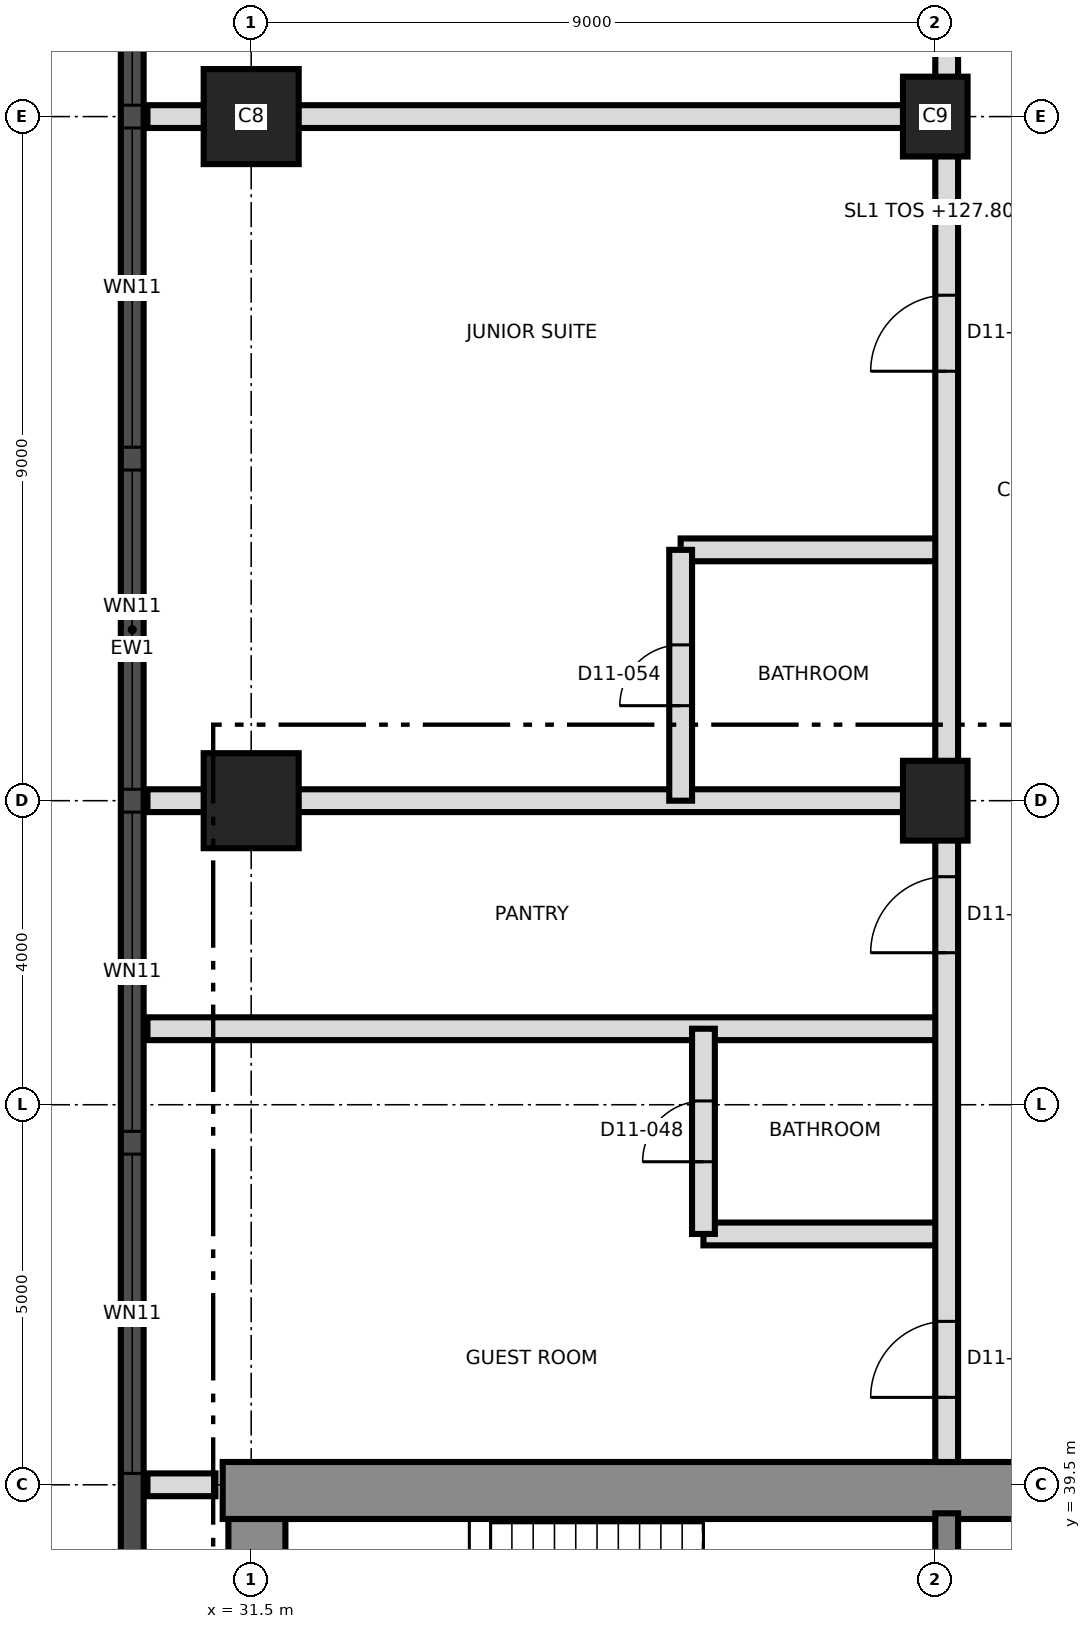
"""IFC4 building model, lengths in metres.
Left out: names, types, materials, properties, quantities, classifications, styles, units other than length and angle.
Written with IfcOpenShell. Run it as: python <this file> out.ifc"""

import sys

from ifc_helpers import new_model, si_unit, direction, frame, frame_2d, origin, origin_2d, place, context, subcontext, project, spatial, rectangle, extrude, element, fill, save


model = new_model("IFC4")
c1 = context("Model", 3, precision=1e-05, world=origin(), true_north=direction((0.0, 1.0)))
c2 = subcontext(c1, "Body", "Model", "MODEL_VIEW")
j1 = project(units=[si_unit("LENGTHUNIT", "METRE"), si_unit("PLANEANGLEUNIT", "RADIAN")], contexts=[c1])
p1 = place(None, origin())
s1 = spatial("IfcSite", under=j1, at=p1, CompositionType="ELEMENT")
p2 = place(p1, origin())
s2 = spatial("IfcBuilding", under=s1, at=p2, CompositionType="ELEMENT")
p3 = place(p2, frame((0.0, 0.0, 127.8)))
s3 = spatial("IfcBuildingStorey", under=s2, at=p3, CompositionType="ELEMENT", Elevation=127.8)
p4 = place(p3, frame((31.575, 21.875, 0.0), z_axis=(0.0, 0.0, 1.0), x_axis=(0.0, 1.0, 0.0)))
e1 = element("IfcWall", 1, at=p4, inside=s3, PredefinedType="SHEAR", context=c2, shape_type="SweptSolid", body=[
    extrude(rectangle(XDim=17.25, YDim=0.75, at=frame_2d((8.625, 0.0))), origin(), (0.0, 0.0, 1.0), 3.7),
])
p5 = place(p3, frame((31.125, 39.425, 0.0), z_axis=(0.0, 0.0, 1.0), x_axis=(1.0, 0.0, 0.0)))
e2 = element("IfcWall", 2, at=p5, inside=s3, PredefinedType="SHEAR", context=c2, shape_type="SweptSolid", body=[
    extrude(rectangle(XDim=27.0, YDim=0.75, at=frame_2d((13.5, 0.0))), origin(), (0.0, 0.0, 1.0), 3.7),
])
p6 = place(p5, frame((10.575, 0.0, 0.0)))
e3 = element("IfcOpeningElement", 3, at=p6, cuts=e2, PredefinedType="OPENING", context=c2, shape_type="SweptSolid", body=[
    extrude(rectangle(XDim=1.2, YDim=2.1, at=frame_2d((0.6, 1.05))), frame((0.0, 0.385, 0.0), z_axis=(0.0, -1.0, 0.0), x_axis=(1.0, 0.0, 0.0)), (0.0, 0.0, 1.0), 0.77),
])
p7 = place(p3, frame((40.65, 33.5, 0.0), z_axis=(0.0, 0.0, 1.0), x_axis=(0.0, 1.0, 0.0)))
e4 = element("IfcWall", 4, at=p7, inside=s3, PredefinedType="SHEAR", context=c2, shape_type="SweptSolid", body=[
    extrude(rectangle(XDim=5.625, YDim=0.3, at=frame_2d((2.812, 0.0))), origin(), (0.0, 0.0, 1.0), 3.7),
])
p8 = place(p3, frame((31.5, 48.5, 0.0), z_axis=(0.0, 0.0, 1.0), x_axis=(1.0, 0.0, 0.0)))
e5 = element("IfcColumn", 5, at=p8, inside=s3, PredefinedType="COLUMN", context=c2, shape_type="SweptSolid", body=[
    extrude(rectangle(XDim=1.25, YDim=1.25, at=origin_2d()), origin(), (0.0, 0.0, 1.0), 3.7),
])
p9 = place(p3, frame((40.5, 48.5, 0.0), z_axis=(0.0, 0.0, 1.0), x_axis=(0.0, 1.0, 0.0)))
e6 = element("IfcColumn", 6, at=p9, inside=s3, PredefinedType="COLUMN", context=c2, shape_type="SweptSolid", body=[
    extrude(rectangle(XDim=1.05, YDim=0.85, at=origin_2d()), origin(), (0.0, 0.0, 1.0), 3.7),
])
p10 = place(p3, frame((31.5, 57.5, 0.0), z_axis=(0.0, 0.0, 1.0), x_axis=(1.0, 0.0, 0.0)))
e7 = element("IfcColumn", 7, at=p10, inside=s3, PredefinedType="COLUMN", context=c2, shape_type="SweptSolid", body=[
    extrude(rectangle(XDim=1.25, YDim=1.25, at=origin_2d()), origin(), (0.0, 0.0, 1.0), 3.7),
])
p11 = place(p3, frame((40.5, 57.5, 0.0), z_axis=(0.0, 0.0, 1.0), x_axis=(0.0, 1.0, 0.0)))
e8 = element("IfcColumn", 8, at=p11, inside=s3, PredefinedType="COLUMN", context=c2, shape_type="SweptSolid", body=[
    extrude(rectangle(XDim=1.05, YDim=0.85, at=origin_2d()), origin(), (0.0, 0.0, 1.0), 3.7),
])
p12 = place(p3, frame((29.935, 66.986, 0.0), z_axis=(0.0, 0.0, 1.0), x_axis=(0.0, -1.0, 0.0)))
e9 = element("IfcWall", 9, at=p12, inside=s3, PredefinedType="SOLIDWALL", context=c2, shape_type="SweptSolid", body=[
    extrude(rectangle(XDim=32.976, YDim=0.3, at=frame_2d((16.488, 0.0))), origin(), (0.0, 0.0, 1.0), 3.4),
])
p13 = place(p12, frame((1.593, 0.0, 0.3)))
e10 = element("IfcOpeningElement", 10, at=p13, cuts=e9, PredefinedType="OPENING", context=c2, shape_type="SweptSolid", body=[
    extrude(rectangle(XDim=1.8, YDim=2.4, at=frame_2d((0.9, 1.2))), frame((0.0, 0.16, 0.0), z_axis=(0.0, -1.0, 0.0), x_axis=(1.0, 0.0, 0.0)), (0.0, 0.0, 1.0), 0.32),
])
p14 = place(p12, frame((5.136, 0.0, 0.9)))
e11 = element("IfcOpeningElement", 11, at=p14, cuts=e9, PredefinedType="OPENING", context=c2, shape_type="SweptSolid", body=[
    extrude(rectangle(XDim=4.2, YDim=1.5, at=frame_2d((2.1, 0.75))), frame((0.0, 0.16, 0.0), z_axis=(0.0, -1.0, 0.0), x_axis=(1.0, 0.0, 0.0)), (0.0, 0.0, 1.0), 0.32),
])
p15 = place(p12, frame((9.636, 0.0, 0.9)))
e12 = element("IfcOpeningElement", 12, at=p15, cuts=e9, PredefinedType="OPENING", context=c2, shape_type="SweptSolid", body=[
    extrude(rectangle(XDim=4.2, YDim=1.5, at=frame_2d((2.1, 0.75))), frame((0.0, 0.16, 0.0), z_axis=(0.0, -1.0, 0.0), x_axis=(1.0, 0.0, 0.0)), (0.0, 0.0, 1.0), 0.32),
])
p16 = place(p12, frame((14.136, 0.0, 0.9)))
e13 = element("IfcOpeningElement", 13, at=p16, cuts=e9, PredefinedType="OPENING", context=c2, shape_type="SweptSolid", body=[
    extrude(rectangle(XDim=4.2, YDim=1.5, at=frame_2d((2.1, 0.75))), frame((0.0, 0.16, 0.0), z_axis=(0.0, -1.0, 0.0), x_axis=(1.0, 0.0, 0.0)), (0.0, 0.0, 1.0), 0.32),
])
p17 = place(p12, frame((18.636, 0.0, 0.9)))
e14 = element("IfcOpeningElement", 14, at=p17, cuts=e9, PredefinedType="OPENING", context=c2, shape_type="SweptSolid", body=[
    extrude(rectangle(XDim=4.2, YDim=1.5, at=frame_2d((2.1, 0.75))), frame((0.0, 0.16, 0.0), z_axis=(0.0, -1.0, 0.0), x_axis=(1.0, 0.0, 0.0)), (0.0, 0.0, 1.0), 0.32),
])
p18 = place(p12, frame((23.136, 0.0, 0.9)))
e15 = element("IfcOpeningElement", 15, at=p18, cuts=e9, PredefinedType="OPENING", context=c2, shape_type="SweptSolid", body=[
    extrude(rectangle(XDim=4.2, YDim=1.5, at=frame_2d((2.1, 0.75))), frame((0.0, 0.16, 0.0), z_axis=(0.0, -1.0, 0.0), x_axis=(1.0, 0.0, 0.0)), (0.0, 0.0, 1.0), 0.32),
])
p19 = place(p12, frame((29.331, 0.0, 0.3)))
e16 = element("IfcOpeningElement", 16, at=p19, cuts=e9, PredefinedType="OPENING", context=c2, shape_type="SweptSolid", body=[
    extrude(rectangle(XDim=1.8, YDim=2.4, at=frame_2d((0.9, 1.2))), frame((0.0, 0.16, 0.0), z_axis=(0.0, -1.0, 0.0), x_axis=(1.0, 0.0, 0.0)), (0.0, 0.0, 1.0), 0.32),
])
p20 = place(p3, frame((30.135, 39.5, 0.0), z_axis=(0.0, 0.0, 1.0), x_axis=(1.0, 0.0, 0.0)))
e17 = element("IfcWall", 17, at=p20, inside=s3, PredefinedType="PARTITIONING", context=c2, shape_type="SweptSolid", body=[
    extrude(rectangle(XDim=0.895, YDim=0.3, at=frame_2d((0.448, 0.0))), origin(), (0.0, 0.0, 1.0), 3.4),
])
p21 = place(p3, frame((37.45, 42.8, 0.0), z_axis=(0.0, 0.0, 1.0), x_axis=(1.0, 0.0, 0.0)))
e18 = element("IfcWall", 18, at=p21, inside=s3, PredefinedType="PARTITIONING", context=c2, shape_type="SweptSolid", body=[
    extrude(rectangle(XDim=3.2, YDim=0.3, at=frame_2d((1.6, 0.0))), origin(), (0.0, 0.0, 1.0), 3.4),
])
for number, where, z_axis, x_axis in (
    (19, (30.135, 45.5, 0.0), (0.0, 0.0, 1.0), (1.0, 0.0, 0.0)),
    (20, (30.135, 48.5, 0.0), (0.0, 0.0, 1.0), (1.0, 0.0, 0.0)),
):
    element("IfcWall", number, at=place(p3, frame(where, z_axis=z_axis, x_axis=x_axis)), inside=s3, PredefinedType="PARTITIONING", context=c2, shape_type="SweptSolid", body=[
        extrude(rectangle(XDim=10.515, YDim=0.3, at=frame_2d((5.257, 0.0))), origin(), (0.0, 0.0, 1.0), 3.4),
    ])
p22 = place(p3, frame((37.15, 51.8, 0.0), z_axis=(0.0, 0.0, 1.0), x_axis=(1.0, 0.0, 0.0)))
e21 = element("IfcWall", 21, at=p22, inside=s3, PredefinedType="PARTITIONING", context=c2, shape_type="SweptSolid", body=[
    extrude(rectangle(XDim=3.5, YDim=0.3, at=frame_2d((1.75, 0.0))), origin(), (0.0, 0.0, 1.0), 3.4),
])
p23 = place(p3, frame((30.135, 57.5, 0.0), z_axis=(0.0, 0.0, 1.0), x_axis=(1.0, 0.0, 0.0)))
e22 = element("IfcWall", 22, at=p23, inside=s3, PredefinedType="PARTITIONING", context=c2, shape_type="SweptSolid", body=[
    extrude(rectangle(XDim=10.515, YDim=0.3, at=frame_2d((5.257, 0.0))), origin(), (0.0, 0.0, 1.0), 3.4),
])
p24 = place(p3, frame((37.15, 48.5, 0.0), z_axis=(0.0, 0.0, 1.0), x_axis=(0.0, 1.0, 0.0)))
e23 = element("IfcWall", 23, at=p24, inside=s3, PredefinedType="PARTITIONING", context=c2, shape_type="SweptSolid", body=[
    extrude(rectangle(XDim=3.3, YDim=0.3, at=frame_2d((1.65, 0.0))), origin(), (0.0, 0.0, 1.0), 3.4),
])
p25 = place(p24, frame((1.25, 0.0, 0.0)))
e24 = element("IfcOpeningElement", 24, at=p25, cuts=e23, PredefinedType="OPENING", context=c2, shape_type="SweptSolid", body=[
    extrude(rectangle(XDim=0.8, YDim=2.1, at=frame_2d((0.4, 1.05))), frame((0.0, 0.16, 0.0), z_axis=(0.0, -1.0, 0.0), x_axis=(1.0, 0.0, 0.0)), (0.0, 0.0, 1.0), 0.32),
])
p26 = place(p3, frame((37.45, 42.8, 0.0), z_axis=(0.0, 0.0, 1.0), x_axis=(0.0, 1.0, 0.0)))
e25 = element("IfcWall", 25, at=p26, inside=s3, PredefinedType="PARTITIONING", context=c2, shape_type="SweptSolid", body=[
    extrude(rectangle(XDim=2.7, YDim=0.3, at=frame_2d((1.35, 0.0))), origin(), (0.0, 0.0, 1.0), 3.4),
])
p27 = place(p26, frame((0.95, 0.0, 0.0)))
e26 = element("IfcOpeningElement", 26, at=p27, cuts=e25, PredefinedType="OPENING", context=c2, shape_type="SweptSolid", body=[
    extrude(rectangle(XDim=0.8, YDim=2.1, at=frame_2d((0.4, 1.05))), frame((0.0, 0.16, 0.0), z_axis=(0.0, -1.0, 0.0), x_axis=(1.0, 0.0, 0.0)), (0.0, 0.0, 1.0), 0.32),
])
p28 = place(p3, frame((40.65, 39.8, 0.0), z_axis=(0.0, 0.0, 1.0), x_axis=(0.0, 1.0, 0.0)))
e27 = element("IfcWall", 27, at=p28, inside=s3, PredefinedType="PARTITIONING", context=c2, shape_type="SweptSolid", body=[
    extrude(rectangle(XDim=37.305, YDim=0.3, at=frame_2d((18.652, 0.0))), origin(), (0.0, 0.0, 1.0), 3.4),
])
p29 = place(p28, frame((0.85, 0.0, 0.0)))
e28 = element("IfcOpeningElement", 28, at=p29, cuts=e27, PredefinedType="OPENING", context=c2, shape_type="SweptSolid", body=[
    extrude(rectangle(XDim=1.0, YDim=2.1, at=frame_2d((0.5, 1.05))), frame((0.0, 0.16, 0.0), z_axis=(0.0, -1.0, 0.0), x_axis=(1.0, 0.0, 0.0)), (0.0, 0.0, 1.0), 0.32),
])
p30 = place(p28, frame((6.7, 0.0, 0.0)))
e29 = element("IfcOpeningElement", 29, at=p30, cuts=e27, PredefinedType="OPENING", context=c2, shape_type="SweptSolid", body=[
    extrude(rectangle(XDim=1.0, YDim=2.1, at=frame_2d((0.5, 1.05))), frame((0.0, 0.16, 0.0), z_axis=(0.0, -1.0, 0.0), x_axis=(1.0, 0.0, 0.0)), (0.0, 0.0, 1.0), 0.32),
])
p31 = place(p28, frame((14.35, 0.0, 0.0)))
e30 = element("IfcOpeningElement", 30, at=p31, cuts=e27, PredefinedType="OPENING", context=c2, shape_type="SweptSolid", body=[
    extrude(rectangle(XDim=1.0, YDim=2.4, at=frame_2d((0.5, 1.2))), frame((0.0, 0.16, 0.0), z_axis=(0.0, -1.0, 0.0), x_axis=(1.0, 0.0, 0.0)), (0.0, 0.0, 1.0), 0.32),
])
p32 = place(p28, frame((21.2, 0.0, 0.0)))
e31 = element("IfcOpeningElement", 31, at=p32, cuts=e27, PredefinedType="OPENING", context=c2, shape_type="SweptSolid", body=[
    extrude(rectangle(XDim=1.0, YDim=2.4, at=frame_2d((0.5, 1.2))), frame((0.0, 0.16, 0.0), z_axis=(0.0, -1.0, 0.0), x_axis=(1.0, 0.0, 0.0)), (0.0, 0.0, 1.0), 0.32),
])
p33 = place(p14, origin())
e32 = element("IfcWindow", 32, at=p33, inside=s3, PartitioningType="SINGLE_PANEL", PredefinedType="WINDOW", context=c2, shape_type="SweptSolid", body=[
    extrude(rectangle(XDim=4.2, YDim=1.5, at=frame_2d((2.1, 0.75))), frame((0.0, 0.03, 0.0), z_axis=(0.0, -1.0, 0.0), x_axis=(1.0, 0.0, 0.0)), (0.0, 0.0, 1.0), 0.06),
])
fill(e11, e32)
p34 = place(p15, origin())
e33 = element("IfcWindow", 33, at=p34, inside=s3, PartitioningType="SINGLE_PANEL", PredefinedType="WINDOW", context=c2, shape_type="SweptSolid", body=[
    extrude(rectangle(XDim=4.2, YDim=1.5, at=frame_2d((2.1, 0.75))), frame((0.0, 0.03, 0.0), z_axis=(0.0, -1.0, 0.0), x_axis=(1.0, 0.0, 0.0)), (0.0, 0.0, 1.0), 0.06),
])
fill(e12, e33)
p35 = place(p16, origin())
e34 = element("IfcWindow", 34, at=p35, inside=s3, PartitioningType="SINGLE_PANEL", PredefinedType="WINDOW", context=c2, shape_type="SweptSolid", body=[
    extrude(rectangle(XDim=4.2, YDim=1.5, at=frame_2d((2.1, 0.75))), frame((0.0, 0.03, 0.0), z_axis=(0.0, -1.0, 0.0), x_axis=(1.0, 0.0, 0.0)), (0.0, 0.0, 1.0), 0.06),
])
fill(e13, e34)
p36 = place(p17, origin())
e35 = element("IfcWindow", 35, at=p36, inside=s3, PartitioningType="SINGLE_PANEL", PredefinedType="WINDOW", context=c2, shape_type="SweptSolid", body=[
    extrude(rectangle(XDim=4.2, YDim=1.5, at=frame_2d((2.1, 0.75))), frame((0.0, 0.03, 0.0), z_axis=(0.0, -1.0, 0.0), x_axis=(1.0, 0.0, 0.0)), (0.0, 0.0, 1.0), 0.06),
])
fill(e14, e35)
p37 = place(p18, origin())
e36 = element("IfcWindow", 36, at=p37, inside=s3, PartitioningType="SINGLE_PANEL", PredefinedType="WINDOW", context=c2, shape_type="SweptSolid", body=[
    extrude(rectangle(XDim=4.2, YDim=1.5, at=frame_2d((2.1, 0.75))), frame((0.0, 0.03, 0.0), z_axis=(0.0, -1.0, 0.0), x_axis=(1.0, 0.0, 0.0)), (0.0, 0.0, 1.0), 0.06),
])
fill(e15, e36)
p38 = place(p27, origin())
e37 = element("IfcDoor", 37, at=p38, inside=s3, OperationType="SINGLE_SWING_LEFT", PredefinedType="DOOR", context=c2, shape_type="SweptSolid", body=[
    extrude(rectangle(XDim=0.8, YDim=2.1, at=frame_2d((0.4, 1.05))), frame((0.0, 0.025, 0.0), z_axis=(0.0, -1.0, 0.0), x_axis=(1.0, 0.0, 0.0)), (0.0, 0.0, 1.0), 0.05),
])
fill(e26, e37)
p39 = place(p29, origin())
e38 = element("IfcDoor", 38, at=p39, inside=s3, OperationType="SINGLE_SWING_LEFT", PredefinedType="DOOR", context=c2, shape_type="SweptSolid", body=[
    extrude(rectangle(XDim=1.0, YDim=2.1, at=frame_2d((0.5, 1.05))), frame((0.0, 0.025, 0.0), z_axis=(0.0, -1.0, 0.0), x_axis=(1.0, 0.0, 0.0)), (0.0, 0.0, 1.0), 0.05),
])
fill(e28, e38)
p40 = place(p30, origin())
e39 = element("IfcDoor", 39, at=p40, inside=s3, OperationType="SINGLE_SWING_RIGHT", PredefinedType="DOOR", context=c2, shape_type="SweptSolid", body=[
    extrude(rectangle(XDim=1.0, YDim=2.1, at=frame_2d((0.5, 1.05))), frame((0.0, 0.025, 0.0), z_axis=(0.0, -1.0, 0.0), x_axis=(1.0, 0.0, 0.0)), (0.0, 0.0, 1.0), 0.05),
])
fill(e29, e39)
p41 = place(p25, origin())
e40 = element("IfcDoor", 40, at=p41, inside=s3, OperationType="SINGLE_SWING_LEFT", PredefinedType="DOOR", context=c2, shape_type="SweptSolid", body=[
    extrude(rectangle(XDim=0.8, YDim=2.1, at=frame_2d((0.4, 1.05))), frame((0.0, 0.025, 0.0), z_axis=(0.0, -1.0, 0.0), x_axis=(1.0, 0.0, 0.0)), (0.0, 0.0, 1.0), 0.05),
])
fill(e24, e40)
p42 = place(p31, origin())
e41 = element("IfcDoor", 41, at=p42, inside=s3, OperationType="SINGLE_SWING_LEFT", PredefinedType="DOOR", context=c2, shape_type="SweptSolid", body=[
    extrude(rectangle(XDim=1.0, YDim=2.4, at=frame_2d((0.5, 1.2))), frame((0.0, 0.025, 0.0), z_axis=(0.0, -1.0, 0.0), x_axis=(1.0, 0.0, 0.0)), (0.0, 0.0, 1.0), 0.05),
])
fill(e30, e41)
save(model, sys.argv[1])
